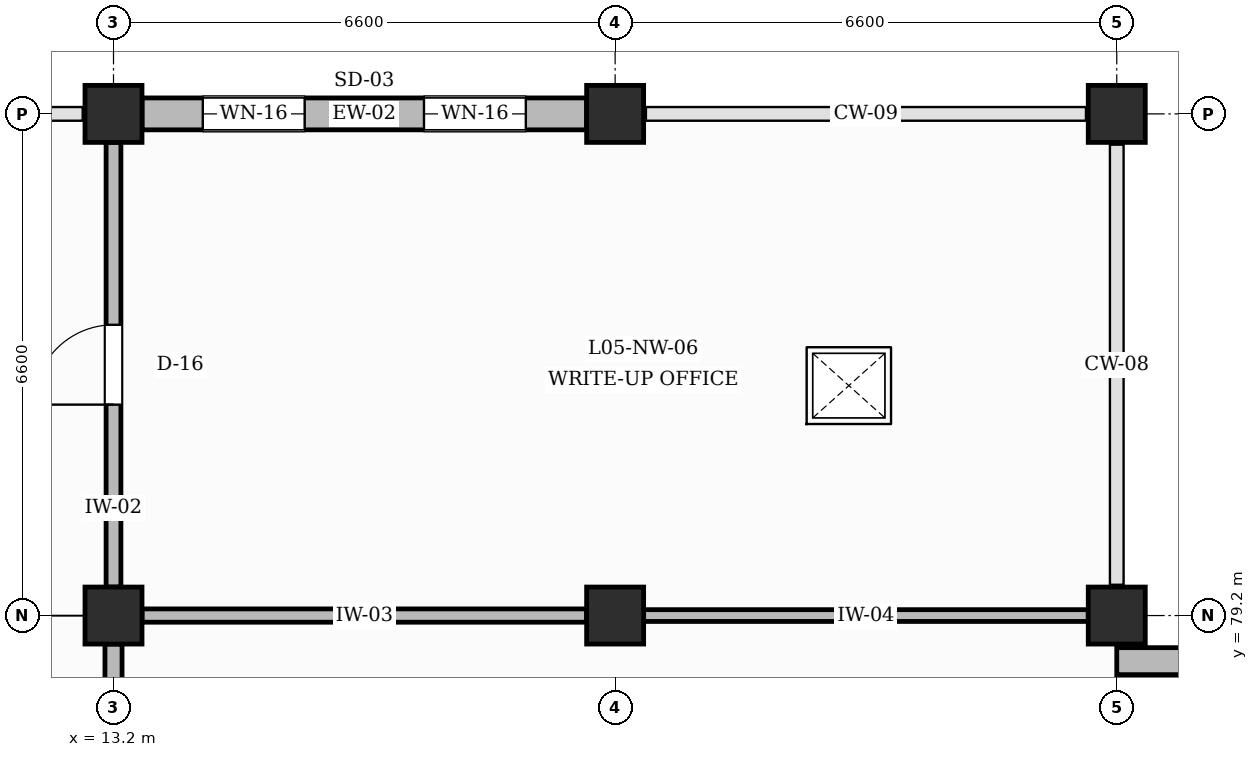
"""IFC4 building model, lengths in metres.
Left out: names, types, materials, properties, quantities, classifications, styles, units other than length and angle.
Written with IfcOpenShell. Run it as: python <this file> out.ifc"""

import sys

from ifc_helpers import new_model, si_unit, direction, frame, frame_2d, origin, origin_2d, place, context, subcontext, project, spatial, rectangle, extrude, element, fill, save


model = new_model("IFC4")
c1 = context("Model", 3, precision=1e-05, world=origin(), true_north=direction((0.0, 1.0)))
c2 = subcontext(c1, "Body", "Model", "MODEL_VIEW")
j1 = project(units=[si_unit("LENGTHUNIT", "METRE"), si_unit("PLANEANGLEUNIT", "RADIAN")], contexts=[c1])
p1 = place(None, origin())
s1 = spatial("IfcSite", under=j1, at=p1, CompositionType="ELEMENT")
p2 = place(p1, origin())
s2 = spatial("IfcBuilding", under=s1, at=p2, CompositionType="ELEMENT")
p3 = place(p2, frame((0.0, 0.0, 22.8)))
s3 = spatial("IfcBuildingStorey", under=s2, at=p3, CompositionType="ELEMENT", Elevation=22.8)
for number, where, z_axis, x_axis in (
    (1, (13.2, 79.2, 0.0), (0.0, 0.0, 1.0), (1.0, 0.0, 0.0)),
    (2, (13.2, 85.8, 0.0), (0.0, 0.0, 1.0), (1.0, 0.0, 0.0)),
    (3, (19.8, 79.2, 0.0), (0.0, 0.0, 1.0), (1.0, 0.0, 0.0)),
    (4, (19.8, 85.8, 0.0), (0.0, 0.0, 1.0), (1.0, 0.0, 0.0)),
    (5, (26.4, 79.2, 0.0), (0.0, 0.0, 1.0), (1.0, 0.0, 0.0)),
    (6, (26.4, 85.8, 0.0), (0.0, 0.0, 1.0), (1.0, 0.0, 0.0)),
):
    element("IfcColumn", number, at=place(p3, frame(where, z_axis=z_axis, x_axis=x_axis)), inside=s3, PredefinedType="COLUMN", context=c2, shape_type="SweptSolid", body=[
        extrude(rectangle(XDim=0.75, YDim=0.75, at=origin_2d()), origin(), (0.0, 0.0, 1.0), 4.2),
    ])
p4 = place(p3, frame((13.575, 85.8, 0.0), z_axis=(0.0, 0.0, 1.0), x_axis=(1.0, 0.0, 0.0)))
e7 = element("IfcWall", 7, at=p4, inside=s3, PredefinedType="SOLIDWALL", context=c2, shape_type="SweptSolid", body=[
    extrude(rectangle(XDim=5.85, YDim=0.42, at=frame_2d((2.925, 0.0))), origin(), (0.0, 0.0, 1.0), 3.27),
])
p5 = place(p4, frame((0.8, 0.0, 0.95)))
e8 = element("IfcOpeningElement", 8, at=p5, cuts=e7, PredefinedType="OPENING", context=c2, shape_type="SweptSolid", body=[
    extrude(rectangle(XDim=1.34, YDim=1.96, at=frame_2d((0.67, 0.98))), frame((0.0, 0.22, 0.0), z_axis=(0.0, -1.0, 0.0), x_axis=(1.0, 0.0, 0.0)), (0.0, 0.0, 1.0), 0.44),
])
p6 = place(p4, frame((3.71, 0.0, 0.95)))
e9 = element("IfcOpeningElement", 9, at=p6, cuts=e7, PredefinedType="OPENING", context=c2, shape_type="SweptSolid", body=[
    extrude(rectangle(XDim=1.34, YDim=1.96, at=frame_2d((0.67, 0.98))), frame((0.0, 0.22, 0.0), z_axis=(0.0, -1.0, 0.0), x_axis=(1.0, 0.0, 0.0)), (0.0, 0.0, 1.0), 0.44),
])
p7 = place(p3, frame((26.4, 78.6, 0.0), z_axis=(0.0, 0.0, 1.0), x_axis=(1.0, 0.0, 0.0)))
e10 = element("IfcWall", 10, at=p7, inside=s3, PredefinedType="SOLIDWALL", context=c2, shape_type="SweptSolid", body=[
    extrude(rectangle(XDim=2.0, YDim=0.355, at=frame_2d((1.0, 0.0))), origin(), (0.0, 0.0, 1.0), 3.27),
])
p8 = place(p3, frame((13.2, 72.975, 0.0), z_axis=(0.0, 0.0, 1.0), x_axis=(0.0, 1.0, 0.0)))
e11 = element("IfcWall", 11, at=p8, inside=s3, PredefinedType="PARTITIONING", context=c2, shape_type="SweptSolid", body=[
    extrude(rectangle(XDim=5.85, YDim=0.225, at=frame_2d((2.925, 0.0))), origin(), (0.0, 0.0, 1.0), 3.17),
])
p9 = place(p3, frame((13.2, 79.575, 0.0), z_axis=(0.0, 0.0, 1.0), x_axis=(0.0, 1.0, 0.0)))
e12 = element("IfcWall", 12, at=p9, inside=s3, PredefinedType="PARTITIONING", context=c2, shape_type="SweptSolid", body=[
    extrude(rectangle(XDim=5.85, YDim=0.195, at=frame_2d((2.925, 0.0))), origin(), (0.0, 0.0, 1.0), 3.17),
])
p10 = place(p9, frame((2.4, 0.0, 0.0)))
e13 = element("IfcOpeningElement", 13, at=p10, cuts=e12, PredefinedType="OPENING", context=c2, shape_type="SweptSolid", body=[
    extrude(rectangle(XDim=1.05, YDim=2.15, at=frame_2d((0.525, 1.075))), frame((0.0, 0.107, 0.0), z_axis=(0.0, -1.0, 0.0), x_axis=(1.0, 0.0, 0.0)), (0.0, 0.0, 1.0), 0.215),
])
p11 = place(p3, frame((13.575, 79.2, 0.0), z_axis=(0.0, 0.0, 1.0), x_axis=(1.0, 0.0, 0.0)))
e14 = element("IfcWall", 14, at=p11, inside=s3, PredefinedType="PARTITIONING", context=c2, shape_type="SweptSolid", body=[
    extrude(rectangle(XDim=5.85, YDim=0.175, at=frame_2d((2.925, 0.0))), origin(), (0.0, 0.0, 1.0), 3.17),
])
p12 = place(p3, frame((20.175, 79.2, 0.0), z_axis=(0.0, 0.0, 1.0), x_axis=(1.0, 0.0, 0.0)))
e15 = element("IfcWall", 15, at=p12, inside=s3, PredefinedType="PARTITIONING", context=c2, shape_type="SweptSolid", body=[
    extrude(rectangle(XDim=5.85, YDim=0.155, at=frame_2d((2.925, 0.0))), origin(), (0.0, 0.0, 1.0), 3.42),
])
p13 = place(p5, origin())
e16 = element("IfcWindow", 16, at=p13, inside=s3, PartitioningType="SINGLE_PANEL", PredefinedType="WINDOW", context=c2, shape_type="SweptSolid", body=[
    extrude(rectangle(XDim=1.34, YDim=1.96, at=frame_2d((0.67, 0.98))), frame((0.0, 0.03, 0.0), z_axis=(0.0, -1.0, 0.0), x_axis=(1.0, 0.0, 0.0)), (0.0, 0.0, 1.0), 0.06),
])
fill(e8, e16)
p14 = place(p6, origin())
e17 = element("IfcWindow", 17, at=p14, inside=s3, PartitioningType="SINGLE_PANEL", PredefinedType="WINDOW", context=c2, shape_type="SweptSolid", body=[
    extrude(rectangle(XDim=1.34, YDim=1.96, at=frame_2d((0.67, 0.98))), frame((0.0, 0.03, 0.0), z_axis=(0.0, -1.0, 0.0), x_axis=(1.0, 0.0, 0.0)), (0.0, 0.0, 1.0), 0.06),
])
fill(e9, e17)
p15 = place(p10, origin())
e18 = element("IfcDoor", 18, at=p15, inside=s3, OperationType="SINGLE_SWING_LEFT", PredefinedType="DOOR", context=c2, shape_type="SweptSolid", body=[
    extrude(rectangle(XDim=1.05, YDim=2.15, at=frame_2d((0.525, 1.075))), frame((0.0, 0.025, 0.0), z_axis=(0.0, -1.0, 0.0), x_axis=(1.0, 0.0, 0.0)), (0.0, 0.0, 1.0), 0.05),
])
fill(e13, e18)
save(model, sys.argv[1])
